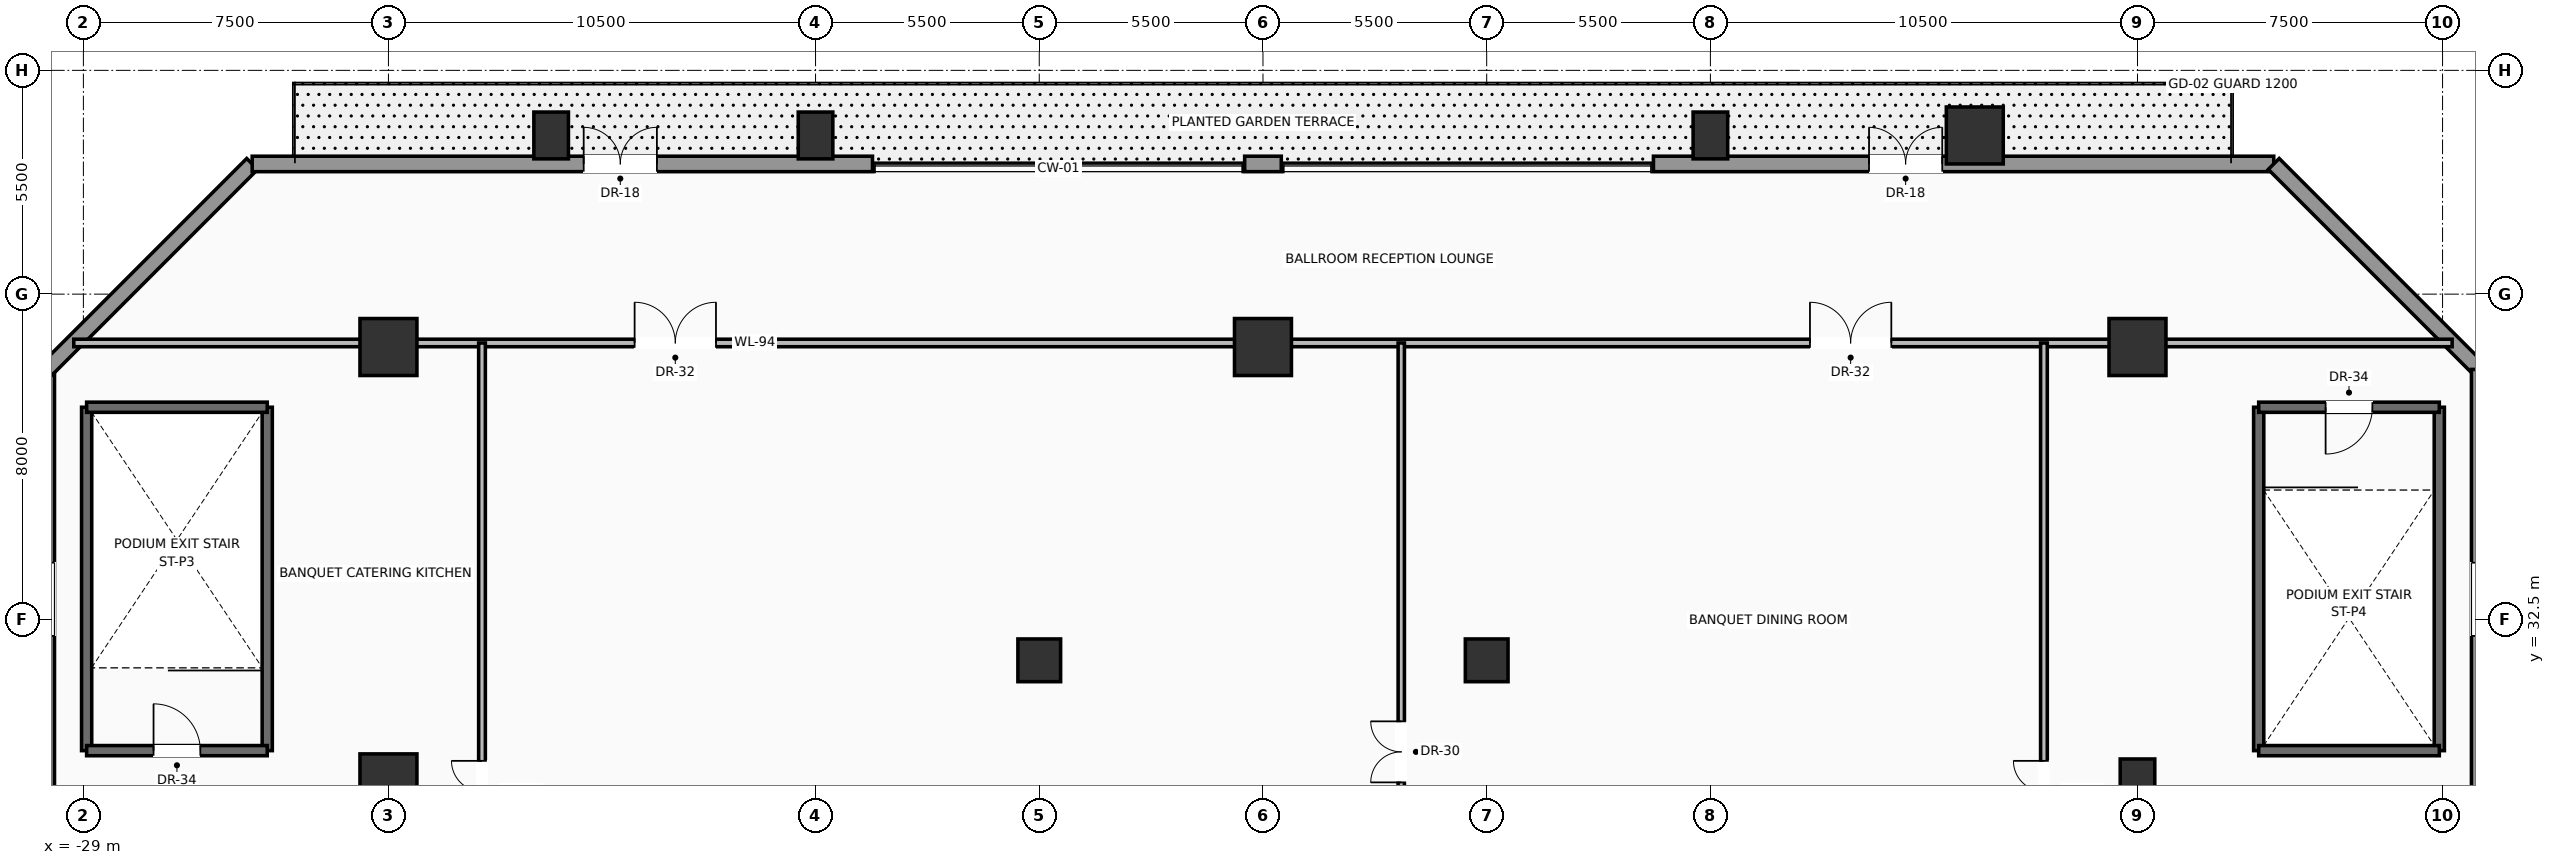
"""IFC4 building model, lengths in metres.
Left out: names, types, materials, properties, quantities, classifications, styles, units other than length and angle.
Written with IfcOpenShell. Run it as: python <this file> out.ifc"""

import sys

from ifc_helpers import new_model, si_unit, direction, frame, frame_2d, origin, origin_2d, place, context, subcontext, project, spatial, rectangle, hollow_rectangle, extrude, source, transform, mapped, element, fill, save


model = new_model("IFC4")
c1 = context("Model", 3, precision=1e-05, world=origin(), true_north=direction((0.0, 1.0)))
c2 = subcontext(c1, "Body", "Model", "MODEL_VIEW")
j1 = project(units=[si_unit("LENGTHUNIT", "METRE"), si_unit("PLANEANGLEUNIT", "RADIAN")], contexts=[c1])
p1 = place(None, origin())
s1 = spatial("IfcSite", under=j1, at=p1, CompositionType="ELEMENT")
p2 = place(p1, origin())
s2 = spatial("IfcBuilding", under=s1, at=p2, CompositionType="ELEMENT")
p3 = place(p2, frame((0.0, 0.0, 16.5)))
s3 = spatial("IfcBuildingStorey", under=s2, at=p3, CompositionType="ELEMENT", Elevation=16.5)
m1 = source(origin(), c2, "Body", "SweptSolid", [
    extrude(rectangle(XDim=1.05, YDim=1.05, at=origin_2d()), origin(), (0.0, 0.0, 1.0), 5.5),
])
for number, where, z_axis, x_axis in (
    (1, (-5.5, 31.5, 0.0), (0.0, 0.0, 1.0), (1.0, 0.0, 0.0)),
    (2, (5.5, 31.5, 0.0), (0.0, 0.0, 1.0), (1.0, 0.0, 0.0)),
):
    element("IfcColumn", number, at=place(p3, frame(where, z_axis=z_axis, x_axis=x_axis)), inside=s3, PredefinedType="COLUMN", context=c2, shape_type="MappedRepresentation", body=[
        mapped(m1, transform((0.0, 0.0, 0.0), scale=1.0)),
    ])
m2 = source(origin(), c2, "Body", "SweptSolid", [
    extrude(hollow_rectangle(XDim=1.4, YDim=1.4, WallThickness=0.07, at=origin_2d()), origin(), (0.0, 0.0, 1.0), 5.5),
])
p4 = place(p3, frame((-21.5, 28.5, 0.0), z_axis=(0.0, 0.0, 1.0), x_axis=(1.0, 0.0, 0.0)))
e3 = element("IfcColumn", 3, at=p4, inside=s3, PredefinedType="COLUMN", context=c2, shape_type="MappedRepresentation", body=[
    mapped(m2, transform((0.0, 0.0, 0.0), scale=1.0)),
])
m3 = source(origin(), c2, "Body", "SweptSolid", [
    extrude(rectangle(XDim=0.85, YDim=1.15, at=origin_2d()), origin(), (0.0, 0.0, 1.0), 5.5),
])
p5 = place(p3, frame((21.5, 28.5, 0.0), z_axis=(0.0, 0.0, 1.0), x_axis=(1.0, 0.0, 0.0)))
e4 = element("IfcColumn", 4, at=p5, inside=s3, PredefinedType="COLUMN", context=c2, shape_type="MappedRepresentation", body=[
    mapped(m3, transform((0.0, 0.0, 0.0), scale=1.0)),
])
p6 = place(p3, frame((-21.5, 39.2, 0.0), z_axis=(0.0, 0.0, 1.0), x_axis=(1.0, 0.0, 0.0)))
e5 = element("IfcColumn", 5, at=p6, inside=s3, PredefinedType="COLUMN", context=c2, shape_type="MappedRepresentation", body=[
    mapped(m2, transform((0.0, 0.0, 0.0), scale=1.0)),
])
p7 = place(p3, frame((-11.0, 44.4, 0.0), z_axis=(0.0, 0.0, 1.0), x_axis=(1.0, 0.0, 0.0)))
e6 = element("IfcColumn", 6, at=p7, inside=s3, PredefinedType="COLUMN", context=c2, shape_type="MappedRepresentation", body=[
    mapped(m3, transform((0.0, 0.0, 0.0), scale=1.0)),
])
p8 = place(p3, frame((0.0, 39.2, 0.0), z_axis=(0.0, 0.0, 1.0), x_axis=(1.0, 0.0, 0.0)))
e7 = element("IfcColumn", 7, at=p8, inside=s3, PredefinedType="COLUMN", context=c2, shape_type="MappedRepresentation", body=[
    mapped(m2, transform((0.0, 0.0, 0.0), scale=1.0)),
])
p9 = place(p3, frame((11.0, 44.4, 0.0), z_axis=(0.0, 0.0, 1.0), x_axis=(1.0, 0.0, 0.0)))
e8 = element("IfcColumn", 8, at=p9, inside=s3, PredefinedType="COLUMN", context=c2, shape_type="MappedRepresentation", body=[
    mapped(m3, transform((0.0, 0.0, 0.0), scale=1.0)),
])
p10 = place(p3, frame((21.5, 39.2, 0.0), z_axis=(0.0, 0.0, 1.0), x_axis=(1.0, 0.0, 0.0)))
e9 = element("IfcColumn", 9, at=p10, inside=s3, PredefinedType="COLUMN", context=c2, shape_type="MappedRepresentation", body=[
    mapped(m2, transform((0.0, 0.0, 0.0), scale=1.0)),
])
p11 = place(p3, frame((-17.5, 44.4, 0.0), z_axis=(0.0, 0.0, 1.0), x_axis=(1.0, 0.0, 0.0)))
e10 = element("IfcColumn", 10, at=p11, inside=s3, PredefinedType="COLUMN", context=c2, shape_type="MappedRepresentation", body=[
    mapped(m3, transform((0.0, 0.0, 0.0), scale=1.0)),
])
p12 = place(p3, frame((17.5, 44.4, 0.0), z_axis=(0.0, 0.0, 1.0), x_axis=(1.0, 0.0, 0.0)))
e11 = element("IfcColumn", 11, at=p12, inside=s3, PredefinedType="COLUMN", context=c2, shape_type="MappedRepresentation", body=[
    mapped(m2, transform((0.0, 0.0, 0.0), scale=1.0)),
])
p13 = place(p3, frame((-29.9, 5.05, 0.0), z_axis=(0.0, 0.0, 1.0), x_axis=(0.0, 1.0, 0.0)))
e12 = element("IfcWall", 12, at=p13, inside=s3, PredefinedType="SOLIDWALL", context=c2, shape_type="SweptSolid", body=[
    extrude(rectangle(XDim=33.6, YDim=0.38, at=frame_2d((16.8, 0.0))), origin(), (0.0, 0.0, 1.0), 3.99),
])
p14 = place(p13, frame((16.55, 0.0, 0.95)))
e13 = element("IfcOpeningElement", 13, at=p14, cuts=e12, PredefinedType="OPENING", context=c2, shape_type="SweptSolid", body=[
    extrude(rectangle(XDim=1.8, YDim=2.4, at=frame_2d((0.9, 1.2))), frame((0.0, 0.2, 0.0), z_axis=(0.0, -1.0, 0.0), x_axis=(1.0, 0.0, 0.0)), (0.0, 0.0, 1.0), 0.4),
])
p15 = place(p13, frame((27.05, 0.0, 0.95)))
e14 = element("IfcOpeningElement", 14, at=p15, cuts=e12, PredefinedType="OPENING", context=c2, shape_type="SweptSolid", body=[
    extrude(rectangle(XDim=1.8, YDim=2.4, at=frame_2d((0.9, 1.2))), frame((0.0, 0.2, 0.0), z_axis=(0.0, -1.0, 0.0), x_axis=(1.0, 0.0, 0.0)), (0.0, 0.0, 1.0), 0.4),
])
p16 = place(p3, frame((-29.9, 38.65, 0.0), z_axis=(0.0, 0.0, 1.0), x_axis=(0.707089688307, 0.707123873653, 0.0)))
e15 = element("IfcWall", 15, at=p16, inside=s3, PredefinedType="SOLIDWALL", context=c2, shape_type="SweptSolid", body=[
    extrude(rectangle(XDim=7.142, YDim=0.38, at=frame_2d((3.571, 0.0))), origin(), (0.0, 0.0, 1.0), 3.99),
])
p17 = place(p3, frame((-0.45, 43.7, 0.0), z_axis=(0.0, 0.0, 1.0), x_axis=(1.0, 0.0, 0.0)))
e16 = element("IfcWall", 16, at=p17, inside=s3, PredefinedType="SOLIDWALL", context=c2, shape_type="SweptSolid", body=[
    extrude(rectangle(XDim=0.9, YDim=0.38, at=frame_2d((0.45, 0.0))), origin(), (0.0, 0.0, 1.0), 3.99),
])
p18 = place(p3, frame((-24.85, 43.7, 0.0), z_axis=(0.0, 0.0, 1.0), x_axis=(1.0, 0.0, 0.0)))
e17 = element("IfcWall", 17, at=p18, inside=s3, PredefinedType="SOLIDWALL", context=c2, shape_type="SweptSolid", body=[
    extrude(rectangle(XDim=15.25, YDim=0.38, at=frame_2d((7.625, 0.0))), origin(), (0.0, 0.0, 1.0), 3.99),
])
p19 = place(p18, frame((8.15, 0.0, 0.0)))
e18 = element("IfcOpeningElement", 18, at=p19, cuts=e17, PredefinedType="OPENING", context=c2, shape_type="SweptSolid", body=[
    extrude(rectangle(XDim=1.8, YDim=2.4, at=frame_2d((0.9, 1.2))), frame((0.0, 0.2, 0.0), z_axis=(0.0, -1.0, 0.0), x_axis=(1.0, 0.0, 0.0)), (0.0, 0.0, 1.0), 0.4),
])
p20 = place(p3, frame((9.6, 43.7, 0.0), z_axis=(0.0, 0.0, 1.0), x_axis=(1.0, 0.0, 0.0)))
e19 = element("IfcWall", 19, at=p20, inside=s3, PredefinedType="SOLIDWALL", context=c2, shape_type="SweptSolid", body=[
    extrude(rectangle(XDim=15.25, YDim=0.38, at=frame_2d((7.625, 0.0))), origin(), (0.0, 0.0, 1.0), 3.99),
])
p21 = place(p20, frame((5.3, 0.0, 0.0)))
e20 = element("IfcOpeningElement", 20, at=p21, cuts=e19, PredefinedType="OPENING", context=c2, shape_type="SweptSolid", body=[
    extrude(rectangle(XDim=1.8, YDim=2.4, at=frame_2d((0.9, 1.2))), frame((0.0, 0.2, 0.0), z_axis=(0.0, -1.0, 0.0), x_axis=(1.0, 0.0, 0.0)), (0.0, 0.0, 1.0), 0.4),
])
p22 = place(p3, frame((24.85, 43.7, 0.0), z_axis=(0.0, 0.0, 1.0), x_axis=(0.707089688307, -0.707123873653, 0.0)))
e21 = element("IfcWall", 21, at=p22, inside=s3, PredefinedType="SOLIDWALL", context=c2, shape_type="SweptSolid", body=[
    extrude(rectangle(XDim=7.142, YDim=0.38, at=frame_2d((3.571, 0.0))), origin(), (0.0, 0.0, 1.0), 3.99),
])
p23 = place(p3, frame((29.9, 38.65, 0.0), z_axis=(0.0, 0.0, 1.0), x_axis=(0.0, -1.0, 0.0)))
e22 = element("IfcWall", 22, at=p23, inside=s3, PredefinedType="SOLIDWALL", context=c2, shape_type="SweptSolid", body=[
    extrude(rectangle(XDim=33.6, YDim=0.38, at=frame_2d((16.8, 0.0))), origin(), (0.0, 0.0, 1.0), 3.99),
])
p24 = place(p23, frame((15.25, 0.0, 0.95)))
e23 = element("IfcOpeningElement", 23, at=p24, cuts=e22, PredefinedType="OPENING", context=c2, shape_type="SweptSolid", body=[
    extrude(rectangle(XDim=1.8, YDim=2.4, at=frame_2d((0.9, 1.2))), frame((0.0, 0.2, 0.0), z_axis=(0.0, -1.0, 0.0), x_axis=(1.0, 0.0, 0.0)), (0.0, 0.0, 1.0), 0.4),
])
p25 = place(p23, frame((4.75, 0.0, 0.95)))
e24 = element("IfcOpeningElement", 24, at=p25, cuts=e22, PredefinedType="OPENING", context=c2, shape_type="SweptSolid", body=[
    extrude(rectangle(XDim=1.8, YDim=2.4, at=frame_2d((0.9, 1.2))), frame((0.0, 0.2, 0.0), z_axis=(0.0, -1.0, 0.0), x_axis=(1.0, 0.0, 0.0)), (0.0, 0.0, 1.0), 0.4),
])
for number, where, z_axis, x_axis in (
    (25, (-28.92, 29.28, 0.0), (0.0, 0.0, 1.0), (0.0, 1.0, 0.0)),
    (26, (-24.48, 29.28, 0.0), (0.0, 0.0, 1.0), (0.0, 1.0, 0.0)),
):
    element("IfcWall", number, at=place(p3, frame(where, z_axis=z_axis, x_axis=x_axis)), inside=s3, PredefinedType="SOLIDWALL", context=c2, shape_type="SweptSolid", body=[
        extrude(rectangle(XDim=8.44, YDim=0.25, at=frame_2d((4.22, 0.0))), origin(), (0.0, 0.0, 1.0), 5.05),
    ])
p26 = place(p3, frame((-28.92, 29.28, 0.0), z_axis=(0.0, 0.0, 1.0), x_axis=(1.0, 0.0, 0.0)))
e27 = element("IfcWall", 27, at=p26, inside=s3, PredefinedType="SOLIDWALL", context=c2, shape_type="SweptSolid", body=[
    extrude(rectangle(XDim=4.44, YDim=0.25, at=frame_2d((2.22, 0.0))), origin(), (0.0, 0.0, 1.0), 5.05),
])
p27 = place(p26, frame((1.645, 0.0, 0.0)))
e28 = element("IfcOpeningElement", 28, at=p27, cuts=e27, PredefinedType="OPENING", context=c2, shape_type="SweptSolid", body=[
    extrude(rectangle(XDim=1.15, YDim=2.2, at=frame_2d((0.575, 1.1))), frame((0.0, 0.135, 0.0), z_axis=(0.0, -1.0, 0.0), x_axis=(1.0, 0.0, 0.0)), (0.0, 0.0, 1.0), 0.27),
])
p28 = place(p3, frame((-24.48, 37.72, 0.0), z_axis=(0.0, 0.0, 1.0), x_axis=(-1.0, 0.0, 0.0)))
e29 = element("IfcWall", 29, at=p28, inside=s3, PredefinedType="SOLIDWALL", context=c2, shape_type="SweptSolid", body=[
    extrude(rectangle(XDim=4.44, YDim=0.25, at=frame_2d((2.22, 0.0))), origin(), (0.0, 0.0, 1.0), 5.05),
])
for number, where, z_axis, x_axis in (
    (30, (24.48, 29.28, 0.0), (0.0, 0.0, 1.0), (0.0, 1.0, 0.0)),
    (31, (28.92, 29.28, 0.0), (0.0, 0.0, 1.0), (0.0, 1.0, 0.0)),
):
    element("IfcWall", number, at=place(p3, frame(where, z_axis=z_axis, x_axis=x_axis)), inside=s3, PredefinedType="SOLIDWALL", context=c2, shape_type="SweptSolid", body=[
        extrude(rectangle(XDim=8.44, YDim=0.25, at=frame_2d((4.22, 0.0))), origin(), (0.0, 0.0, 1.0), 5.05),
    ])
p29 = place(p3, frame((24.48, 29.28, 0.0), z_axis=(0.0, 0.0, 1.0), x_axis=(1.0, 0.0, 0.0)))
e32 = element("IfcWall", 32, at=p29, inside=s3, PredefinedType="SOLIDWALL", context=c2, shape_type="SweptSolid", body=[
    extrude(rectangle(XDim=4.44, YDim=0.25, at=frame_2d((2.22, 0.0))), origin(), (0.0, 0.0, 1.0), 5.05),
])
p30 = place(p3, frame((28.92, 37.72, 0.0), z_axis=(0.0, 0.0, 1.0), x_axis=(-1.0, 0.0, 0.0)))
e33 = element("IfcWall", 33, at=p30, inside=s3, PredefinedType="SOLIDWALL", context=c2, shape_type="SweptSolid", body=[
    extrude(rectangle(XDim=4.44, YDim=0.25, at=frame_2d((2.22, 0.0))), origin(), (0.0, 0.0, 1.0), 5.05),
])
p31 = place(p30, frame((1.645, 0.0, 0.0)))
e34 = element("IfcOpeningElement", 34, at=p31, cuts=e33, PredefinedType="OPENING", context=c2, shape_type="SweptSolid", body=[
    extrude(rectangle(XDim=1.15, YDim=2.2, at=frame_2d((0.575, 1.1))), frame((0.0, 0.135, 0.0), z_axis=(0.0, -1.0, 0.0), x_axis=(1.0, 0.0, 0.0)), (0.0, 0.0, 1.0), 0.27),
])
p32 = place(p3, frame((-29.236, 39.3, 0.0), z_axis=(0.0, 0.0, 1.0), x_axis=(1.0, 0.0, 0.0)))
e35 = element("IfcWall", 35, at=p32, inside=s3, PredefinedType="PARTITIONING", context=c2, shape_type="SweptSolid", body=[
    extrude(rectangle(XDim=58.472, YDim=0.185, at=frame_2d((29.236, 0.0))), origin(), (0.0, 0.0, 1.0), 4.002),
])
p33 = place(p32, frame((13.788, 0.0, 0.0)))
e36 = element("IfcOpeningElement", 36, at=p33, cuts=e35, PredefinedType="OPENING", context=c2, shape_type="SweptSolid", body=[
    extrude(rectangle(XDim=2.0, YDim=2.4, at=frame_2d((1.0, 1.2))), frame((0.0, 0.103, 0.0), z_axis=(0.0, -1.0, 0.0), x_axis=(1.0, 0.0, 0.0)), (0.0, 0.0, 1.0), 0.205),
])
p34 = place(p32, frame((42.684, 0.0, 0.0)))
e37 = element("IfcOpeningElement", 37, at=p34, cuts=e35, PredefinedType="OPENING", context=c2, shape_type="SweptSolid", body=[
    extrude(rectangle(XDim=2.0, YDim=2.4, at=frame_2d((1.0, 1.2))), frame((0.0, 0.103, 0.0), z_axis=(0.0, -1.0, 0.0), x_axis=(1.0, 0.0, 0.0)), (0.0, 0.0, 1.0), 0.205),
])
p35 = place(p3, frame((-19.2, 19.2, 0.0), z_axis=(0.0, 0.0, 1.0), x_axis=(0.0, 1.0, 0.0)))
e38 = element("IfcWall", 38, at=p35, inside=s3, PredefinedType="PARTITIONING", context=c2, shape_type="SweptSolid", body=[
    extrude(rectangle(XDim=20.1, YDim=0.165, at=frame_2d((10.05, 0.0))), origin(), (0.0, 0.0, 1.0), 4.002),
])
p36 = place(p35, frame((8.329, 0.0, 0.0)))
e39 = element("IfcOpeningElement", 39, at=p36, cuts=e38, PredefinedType="OPENING", context=c2, shape_type="SweptSolid", body=[
    extrude(rectangle(XDim=1.5, YDim=2.25, at=frame_2d((0.75, 1.125))), frame((0.0, 0.093, 0.0), z_axis=(0.0, -1.0, 0.0), x_axis=(1.0, 0.0, 0.0)), (0.0, 0.0, 1.0), 0.185),
])
p37 = place(p3, frame((19.2, 19.2, 0.0), z_axis=(0.0, 0.0, 1.0), x_axis=(0.0, 1.0, 0.0)))
e40 = element("IfcWall", 40, at=p37, inside=s3, PredefinedType="PARTITIONING", context=c2, shape_type="SweptSolid", body=[
    extrude(rectangle(XDim=20.1, YDim=0.165, at=frame_2d((10.05, 0.0))), origin(), (0.0, 0.0, 1.0), 4.002),
])
p38 = place(p37, frame((8.329, 0.0, 0.0)))
e41 = element("IfcOpeningElement", 41, at=p38, cuts=e40, PredefinedType="OPENING", context=c2, shape_type="SweptSolid", body=[
    extrude(rectangle(XDim=1.5, YDim=2.25, at=frame_2d((0.75, 1.125))), frame((0.0, 0.093, 0.0), z_axis=(0.0, -1.0, 0.0), x_axis=(1.0, 0.0, 0.0)), (0.0, 0.0, 1.0), 0.185),
])
p39 = place(p3, frame((3.4, 19.2, 0.0), z_axis=(0.0, 0.0, 1.0), x_axis=(0.0, 1.0, 0.0)))
e42 = element("IfcWall", 42, at=p39, inside=s3, PredefinedType="MOVABLE", context=c2, shape_type="SweptSolid", body=[
    extrude(rectangle(XDim=20.1, YDim=0.155, at=frame_2d((10.05, 0.0))), origin(), (0.0, 0.0, 1.0), 4.002),
])
p40 = place(p39, frame((9.3, 0.0, 0.0)))
e43 = element("IfcOpeningElement", 43, at=p40, cuts=e42, PredefinedType="OPENING", context=c2, shape_type="SweptSolid", body=[
    extrude(rectangle(XDim=1.5, YDim=2.25, at=frame_2d((0.75, 1.125))), frame((0.0, 0.087, 0.0), z_axis=(0.0, -1.0, 0.0), x_axis=(1.0, 0.0, 0.0)), (0.0, 0.0, 1.0), 0.175),
])
m4 = source(origin(), c2, "Body", "SweptSolid", [
    extrude(rectangle(XDim=1.8, YDim=2.4, at=frame_2d((0.9, 1.2))), frame((0.0, 0.025, 0.0), z_axis=(0.0, -1.0, 0.0), x_axis=(1.0, 0.0, 0.0)), (0.0, 0.0, 1.0), 0.05),
])
p41 = place(p19, origin())
e44 = element("IfcDoor", 44, at=p41, inside=s3, OperationType="DOUBLE_DOOR_SINGLE_SWING", PredefinedType="DOOR", context=c2, shape_type="MappedRepresentation", body=[
    mapped(m4, transform((0.0, 0.0, 0.0), scale=1.0)),
])
fill(e18, e44)
p42 = place(p21, origin())
e45 = element("IfcDoor", 45, at=p42, inside=s3, OperationType="DOUBLE_DOOR_SINGLE_SWING", PredefinedType="DOOR", context=c2, shape_type="MappedRepresentation", body=[
    mapped(m4, transform((0.0, 0.0, 0.0), scale=1.0)),
])
fill(e20, e45)
m5 = source(origin(), c2, "Body", "SweptSolid", [
    extrude(rectangle(XDim=1.15, YDim=2.2, at=frame_2d((0.575, 1.1))), frame((0.0, 0.025, 0.0), z_axis=(0.0, -1.0, 0.0), x_axis=(1.0, 0.0, 0.0)), (0.0, 0.0, 1.0), 0.05),
])
p43 = place(p27, origin())
e46 = element("IfcDoor", 46, at=p43, inside=s3, OperationType="SINGLE_SWING_LEFT", PredefinedType="DOOR", context=c2, shape_type="MappedRepresentation", body=[
    mapped(m5, transform((0.0, 0.0, 0.0), scale=1.0)),
])
fill(e28, e46)
p44 = place(p31, origin())
e47 = element("IfcDoor", 47, at=p44, inside=s3, OperationType="SINGLE_SWING_RIGHT", PredefinedType="DOOR", context=c2, shape_type="MappedRepresentation", body=[
    mapped(m5, transform((0.0, 0.0, 0.0), scale=1.0)),
])
fill(e34, e47)
m6 = source(origin(), c2, "Body", "SweptSolid", [
    extrude(rectangle(XDim=2.0, YDim=2.4, at=frame_2d((1.0, 1.2))), frame((0.0, 0.025, 0.0), z_axis=(0.0, -1.0, 0.0), x_axis=(1.0, 0.0, 0.0)), (0.0, 0.0, 1.0), 0.05),
])
p45 = place(p33, origin())
e48 = element("IfcDoor", 48, at=p45, inside=s3, OperationType="DOUBLE_DOOR_SINGLE_SWING", PredefinedType="DOOR", context=c2, shape_type="MappedRepresentation", body=[
    mapped(m6, transform((0.0, 0.0, 0.0), scale=1.0)),
])
fill(e36, e48)
p46 = place(p34, origin())
e49 = element("IfcDoor", 49, at=p46, inside=s3, OperationType="DOUBLE_DOOR_SINGLE_SWING", PredefinedType="DOOR", context=c2, shape_type="MappedRepresentation", body=[
    mapped(m6, transform((0.0, 0.0, 0.0), scale=1.0)),
])
fill(e37, e49)
m7 = source(origin(), c2, "Body", "SweptSolid", [
    extrude(rectangle(XDim=1.5, YDim=2.25, at=frame_2d((0.75, 1.125))), frame((0.0, 0.025, 0.0), z_axis=(0.0, -1.0, 0.0), x_axis=(1.0, 0.0, 0.0)), (0.0, 0.0, 1.0), 0.05),
])
p47 = place(p36, origin())
e50 = element("IfcDoor", 50, at=p47, inside=s3, OperationType="DOUBLE_DOOR_SINGLE_SWING", PredefinedType="DOOR", context=c2, shape_type="MappedRepresentation", body=[
    mapped(m7, transform((0.0, 0.0, 0.0), scale=1.0)),
])
fill(e39, e50)
p48 = place(p38, origin())
e51 = element("IfcDoor", 51, at=p48, inside=s3, OperationType="DOUBLE_DOOR_SINGLE_SWING", PredefinedType="DOOR", context=c2, shape_type="MappedRepresentation", body=[
    mapped(m7, transform((0.0, 0.0, 0.0), scale=1.0)),
])
fill(e41, e51)
p49 = place(p40, origin())
e52 = element("IfcDoor", 52, at=p49, inside=s3, OperationType="DOUBLE_DOOR_SINGLE_SWING", PredefinedType="DOOR", context=c2, shape_type="MappedRepresentation", body=[
    mapped(m7, transform((0.0, 0.0, 0.0), scale=1.0)),
])
fill(e43, e52)
save(model, sys.argv[1])
